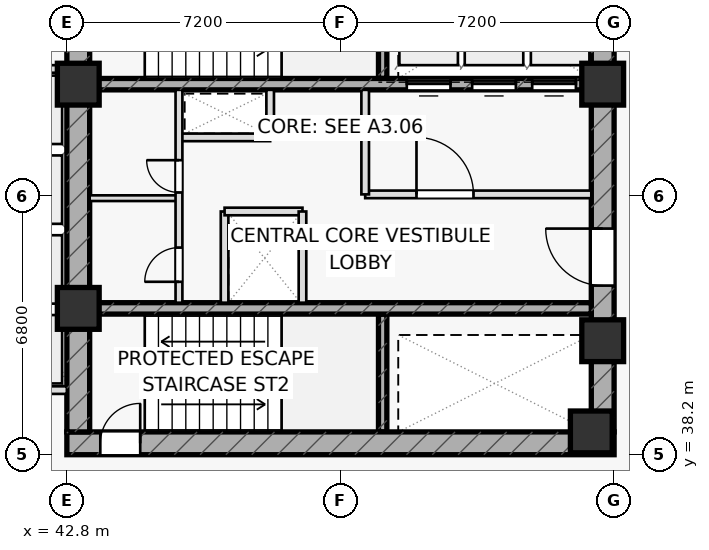
"""IFC4 building model, lengths in metres.
Left out: names, types, materials, properties, quantities, classifications, styles, units other than length and angle.
Written with IfcOpenShell. Run it as: python <this file> out.ifc"""

import sys

from ifc_helpers import new_model, si_unit, direction, frame, frame_2d, origin, origin_2d, place, context, subcontext, project, spatial, rectangle, extrude, element, fill, save


model = new_model("IFC4")
c1 = context("Model", 3, precision=1e-05, world=origin(), true_north=direction((0.0, 1.0)))
c2 = subcontext(c1, "Body", "Model", "MODEL_VIEW")
j1 = project(units=[si_unit("LENGTHUNIT", "METRE"), si_unit("PLANEANGLEUNIT", "RADIAN")], contexts=[c1])
p1 = place(None, origin())
s1 = spatial("IfcSite", under=j1, at=p1, CompositionType="ELEMENT")
p2 = place(p1, origin())
s2 = spatial("IfcBuilding", under=s1, at=p2, CompositionType="ELEMENT")
p3 = place(p2, frame((0.0, 0.0, 78.3)))
s3 = spatial("IfcBuildingStorey", under=s2, at=p3, CompositionType="ELEMENT", Elevation=78.3)
for number, where, z_axis, x_axis in (
    (1, (51.11, 48.1, 0.0), (0.0, 0.0, 1.0), (0.0, 1.0, 0.0)),
    (2, (51.11, 38.8, 0.0), (0.0, 0.0, 1.0), (0.0, 1.0, 0.0)),
):
    element("IfcWall", number, at=place(p3, frame(where, z_axis=z_axis, x_axis=x_axis)), inside=s3, PredefinedType="SHEAR", context=c2, shape_type="SweptSolid", body=[
        extrude(rectangle(XDim=3.1, YDim=0.22, at=frame_2d((1.55, 0.0))), origin(), (0.0, 0.0, 1.0), 3.6),
    ])
p4 = place(p3, frame((42.8, 38.5, 0.0), z_axis=(0.0, 0.0, 1.0), x_axis=(1.0, 0.0, 0.0)))
e3 = element("IfcWall", 3, at=p4, inside=s3, PredefinedType="SHEAR", context=c2, shape_type="SweptSolid", body=[
    extrude(rectangle(XDim=14.4, YDim=0.6, at=frame_2d((7.2, 0.0))), origin(), (0.0, 0.0, 1.0), 3.6),
])
p5 = place(p4, frame((0.88, 0.0, 0.0)))
e4 = element("IfcOpeningElement", 4, at=p5, cuts=e3, PredefinedType="OPENING", context=c2, shape_type="SweptSolid", body=[
    extrude(rectangle(XDim=1.05, YDim=2.2, at=frame_2d((0.525, 1.1))), frame((0.0, 0.31, 0.0), z_axis=(0.0, -1.0, 0.0), x_axis=(1.0, 0.0, 0.0)), (0.0, 0.0, 1.0), 0.62),
])
p6 = place(p3, frame((43.1, 38.8, 0.0), z_axis=(0.0, 0.0, 1.0), x_axis=(0.0, 1.0, 0.0)))
e5 = element("IfcWall", 5, at=p6, inside=s3, PredefinedType="SHEAR", context=c2, shape_type="SweptSolid", body=[
    extrude(rectangle(XDim=12.4, YDim=0.6, at=frame_2d((6.2, 0.0))), origin(), (0.0, 0.0, 1.0), 3.6),
])
p7 = place(p3, frame((56.9, 38.8, 0.0), z_axis=(0.0, 0.0, 1.0), x_axis=(0.0, 1.0, 0.0)))
e6 = element("IfcWall", 6, at=p7, inside=s3, PredefinedType="SHEAR", context=c2, shape_type="SweptSolid", body=[
    extrude(rectangle(XDim=12.4, YDim=0.6, at=frame_2d((6.2, 0.0))), origin(), (0.0, 0.0, 1.0), 3.6),
])
p8 = place(p7, frame((3.85, 0.0, 0.0)))
e7 = element("IfcOpeningElement", 7, at=p8, cuts=e6, PredefinedType="OPENING", context=c2, shape_type="SweptSolid", body=[
    extrude(rectangle(XDim=1.5, YDim=2.2, at=frame_2d((0.75, 1.1))), frame((0.0, 0.31, 0.0), z_axis=(0.0, -1.0, 0.0), x_axis=(1.0, 0.0, 0.0)), (0.0, 0.0, 1.0), 0.62),
])
p9 = place(p3, frame((43.4, 47.95, 0.0), z_axis=(0.0, 0.0, 1.0), x_axis=(1.0, 0.0, 0.0)))
e8 = element("IfcWall", 8, at=p9, inside=s3, PredefinedType="SHEAR", context=c2, shape_type="SweptSolid", body=[
    extrude(rectangle(XDim=13.2, YDim=0.3, at=frame_2d((6.6, 0.0))), origin(), (0.0, 0.0, 1.0), 3.6),
])
p10 = place(p9, frame((8.345, 0.0, 0.0)))
e9 = element("IfcOpeningElement", 9, at=p10, cuts=e8, PredefinedType="OPENING", context=c2, shape_type="SweptSolid", body=[
    extrude(rectangle(XDim=1.15, YDim=2.2, at=frame_2d((0.575, 1.1))), frame((0.0, 0.16, 0.0), z_axis=(0.0, -1.0, 0.0), x_axis=(1.0, 0.0, 0.0)), (0.0, 0.0, 1.0), 0.32),
])
p11 = place(p9, frame((10.065, 0.0, 0.0)))
e10 = element("IfcOpeningElement", 10, at=p11, cuts=e8, PredefinedType="OPENING", context=c2, shape_type="SweptSolid", body=[
    extrude(rectangle(XDim=1.15, YDim=2.2, at=frame_2d((0.575, 1.1))), frame((0.0, 0.16, 0.0), z_axis=(0.0, -1.0, 0.0), x_axis=(1.0, 0.0, 0.0)), (0.0, 0.0, 1.0), 0.32),
])
p12 = place(p9, frame((11.645, 0.0, 0.0)))
e11 = element("IfcOpeningElement", 11, at=p12, cuts=e8, PredefinedType="OPENING", context=c2, shape_type="SweptSolid", body=[
    extrude(rectangle(XDim=1.15, YDim=2.2, at=frame_2d((0.575, 1.1))), frame((0.0, 0.16, 0.0), z_axis=(0.0, -1.0, 0.0), x_axis=(1.0, 0.0, 0.0)), (0.0, 0.0, 1.0), 0.32),
])
p13 = place(p3, frame((43.4, 42.05, 0.0), z_axis=(0.0, 0.0, 1.0), x_axis=(1.0, 0.0, 0.0)))
e12 = element("IfcWall", 12, at=p13, inside=s3, PredefinedType="SHEAR", context=c2, shape_type="SweptSolid", body=[
    extrude(rectangle(XDim=13.2, YDim=0.3, at=frame_2d((6.6, 0.0))), origin(), (0.0, 0.0, 1.0), 3.6),
])
for number, where, z_axis, x_axis in (
    (13, (43.1, 47.95, 0.0), (0.0, 0.0, 1.0), (1.0, 0.0, 0.0)),
    (14, (56.9, 47.95, 0.0), (0.0, 0.0, 1.0), (1.0, 0.0, 0.0)),
    (15, (43.1, 42.05, 0.0), (0.0, 0.0, 1.0), (1.0, 0.0, 0.0)),
    (16, (56.9, 41.2, 0.0), (0.0, 0.0, 1.0), (1.0, 0.0, 0.0)),
    (17, (56.6, 38.8, 0.0), (0.0, 0.0, 1.0), (1.0, 0.0, 0.0)),
):
    element("IfcColumn", number, at=place(p3, frame(where, z_axis=z_axis, x_axis=x_axis)), inside=s3, PredefinedType="COLUMN", context=c2, shape_type="SweptSolid", body=[
        extrude(rectangle(XDim=1.1, YDim=1.1, at=origin_2d()), origin(), (0.0, 0.0, 1.0), 3.6),
    ])
for number, where, z_axis, x_axis in (
    (18, (40.3, 39.9, 0.0), (0.0, 0.0, 1.0), (1.0, 0.0, 0.0)),
    (19, (40.3, 48.35, 0.0), (0.0, 0.0, 1.0), (1.0, 0.0, 0.0)),
):
    element("IfcWall", number, at=place(p3, frame(where, z_axis=z_axis, x_axis=x_axis)), inside=s3, PredefinedType="PARTITIONING", context=c2, shape_type="SweptSolid", body=[
        extrude(rectangle(XDim=2.5, YDim=0.2, at=frame_2d((1.25, 0.0))), origin(), (0.0, 0.0, 1.0), 3.6),
    ])
p14 = place(p3, frame((45.75, 46.55, 0.0), z_axis=(0.0, 0.0, 1.0), x_axis=(1.0, 0.0, 0.0)))
e20 = element("IfcWall", 20, at=p14, inside=s3, PredefinedType="PARTITIONING", context=c2, shape_type="SweptSolid", body=[
    extrude(rectangle(XDim=2.4, YDim=0.2, at=frame_2d((1.2, 0.0))), origin(), (0.0, 0.0, 1.0), 3.6),
])
p15 = place(p3, frame((48.15, 46.55, 0.0), z_axis=(0.0, 0.0, 1.0), x_axis=(0.0, 1.0, 0.0)))
e21 = element("IfcWall", 21, at=p15, inside=s3, PredefinedType="PARTITIONING", context=c2, shape_type="SweptSolid", body=[
    extrude(rectangle(XDim=1.25, YDim=0.2, at=frame_2d((0.625, 0.0))), origin(), (0.0, 0.0, 1.0), 3.6),
])
p16 = place(p3, frame((46.95, 42.2, 0.0), z_axis=(0.0, 0.0, 1.0), x_axis=(0.0, 1.0, 0.0)))
e22 = element("IfcWall", 22, at=p16, inside=s3, PredefinedType="PARTITIONING", context=c2, shape_type="SweptSolid", body=[
    extrude(rectangle(XDim=2.4, YDim=0.2, at=frame_2d((1.2, 0.0))), origin(), (0.0, 0.0, 1.0), 3.6),
])
p17 = place(p3, frame((46.95, 44.6, 0.0), z_axis=(0.0, 0.0, 1.0), x_axis=(1.0, 0.0, 0.0)))
e23 = element("IfcWall", 23, at=p17, inside=s3, PredefinedType="PARTITIONING", context=c2, shape_type="SweptSolid", body=[
    extrude(rectangle(XDim=2.05, YDim=0.2, at=frame_2d((1.025, 0.0))), origin(), (0.0, 0.0, 1.0), 3.6),
])
p18 = place(p3, frame((50.65, 45.05, 0.0), z_axis=(0.0, 0.0, 1.0), x_axis=(1.0, 0.0, 0.0)))
e24 = element("IfcWall", 24, at=p18, inside=s3, PredefinedType="PARTITIONING", context=c2, shape_type="SweptSolid", body=[
    extrude(rectangle(XDim=5.95, YDim=0.2, at=frame_2d((2.975, 0.0))), origin(), (0.0, 0.0, 1.0), 3.6),
])
p19 = place(p18, frame((1.35, 0.0, 0.0)))
e25 = element("IfcOpeningElement", 25, at=p19, cuts=e24, PredefinedType="OPENING", context=c2, shape_type="SweptSolid", body=[
    extrude(rectangle(XDim=1.5, YDim=2.2, at=frame_2d((0.75, 1.1))), frame((0.0, 0.11, 0.0), z_axis=(0.0, -1.0, 0.0), x_axis=(1.0, 0.0, 0.0)), (0.0, 0.0, 1.0), 0.22),
])
p20 = place(p3, frame((50.65, 45.05, 0.0), z_axis=(0.0, 0.0, 1.0), x_axis=(0.0, 1.0, 0.0)))
e26 = element("IfcWall", 26, at=p20, inside=s3, PredefinedType="PARTITIONING", context=c2, shape_type="SweptSolid", body=[
    extrude(rectangle(XDim=2.75, YDim=0.2, at=frame_2d((1.375, 0.0))), origin(), (0.0, 0.0, 1.0), 3.6),
])
p21 = place(p3, frame((43.4, 44.95, 0.0), z_axis=(0.0, 0.0, 1.0), x_axis=(1.0, 0.0, 0.0)))
e27 = element("IfcWall", 27, at=p21, inside=s3, PredefinedType="PARTITIONING", context=c2, shape_type="SweptSolid", body=[
    extrude(rectangle(XDim=2.35, YDim=0.15, at=frame_2d((1.175, 0.0))), origin(), (0.0, 0.0, 1.0), 3.6),
])
p22 = place(p3, frame((45.75, 42.2, 0.0), z_axis=(0.0, 0.0, 1.0), x_axis=(0.0, 1.0, 0.0)))
e28 = element("IfcWall", 28, at=p22, inside=s3, PredefinedType="PARTITIONING", context=c2, shape_type="SweptSolid", body=[
    extrude(rectangle(XDim=5.6, YDim=0.18, at=frame_2d((2.8, 0.0))), origin(), (0.0, 0.0, 1.0), 3.6),
])
p23 = place(p22, frame((0.55, 0.0, 0.0)))
e29 = element("IfcOpeningElement", 29, at=p23, cuts=e28, PredefinedType="OPENING", context=c2, shape_type="SweptSolid", body=[
    extrude(rectangle(XDim=0.9, YDim=2.05, at=frame_2d((0.45, 1.025))), frame((0.0, 0.1, 0.0), z_axis=(0.0, -1.0, 0.0), x_axis=(1.0, 0.0, 0.0)), (0.0, 0.0, 1.0), 0.2),
])
p24 = place(p22, frame((2.9, 0.0, 0.0)))
e30 = element("IfcOpeningElement", 30, at=p24, cuts=e28, PredefinedType="OPENING", context=c2, shape_type="SweptSolid", body=[
    extrude(rectangle(XDim=0.85, YDim=2.05, at=frame_2d((0.425, 1.025))), frame((0.0, 0.1, 0.0), z_axis=(0.0, -1.0, 0.0), x_axis=(1.0, 0.0, 0.0)), (0.0, 0.0, 1.0), 0.2),
])
p25 = place(p3, frame((49.0, 42.2, 0.0), z_axis=(0.0, 0.0, 1.0), x_axis=(0.0, 1.0, 0.0)))
e31 = element("IfcWall", 31, at=p25, inside=s3, PredefinedType="PARTITIONING", context=c2, shape_type="SweptSolid", body=[
    extrude(rectangle(XDim=2.4, YDim=0.2, at=frame_2d((1.2, 0.0))), origin(), (0.0, 0.0, 1.0), 3.6),
])
p26 = place(p5, origin())
e32 = element("IfcDoor", 32, at=p26, inside=s3, OperationType="SINGLE_SWING_RIGHT", PredefinedType="DOOR", context=c2, shape_type="SweptSolid", body=[
    extrude(rectangle(XDim=1.05, YDim=2.2, at=frame_2d((0.525, 1.1))), frame((0.0, 0.025, 0.0), z_axis=(0.0, -1.0, 0.0), x_axis=(1.0, 0.0, 0.0)), (0.0, 0.0, 1.0), 0.05),
])
fill(e4, e32)
p27 = place(p8, origin())
e33 = element("IfcDoor", 33, at=p27, inside=s3, OperationType="SINGLE_SWING_RIGHT", PredefinedType="DOOR", context=c2, shape_type="SweptSolid", body=[
    extrude(rectangle(XDim=1.5, YDim=2.2, at=frame_2d((0.75, 1.1))), frame((0.0, 0.025, 0.0), z_axis=(0.0, -1.0, 0.0), x_axis=(1.0, 0.0, 0.0)), (0.0, 0.0, 1.0), 0.05),
])
fill(e7, e33)
p28 = place(p19, origin())
e34 = element("IfcDoor", 34, at=p28, inside=s3, OperationType="SINGLE_SWING_LEFT", PredefinedType="DOOR", context=c2, shape_type="SweptSolid", body=[
    extrude(rectangle(XDim=1.5, YDim=2.2, at=frame_2d((0.75, 1.1))), frame((0.0, 0.025, 0.0), z_axis=(0.0, -1.0, 0.0), x_axis=(1.0, 0.0, 0.0)), (0.0, 0.0, 1.0), 0.05),
])
fill(e25, e34)
p29 = place(p23, origin())
e35 = element("IfcDoor", 35, at=p29, inside=s3, OperationType="SINGLE_SWING_LEFT", PredefinedType="DOOR", context=c2, shape_type="SweptSolid", body=[
    extrude(rectangle(XDim=0.9, YDim=2.05, at=frame_2d((0.45, 1.025))), frame((0.0, 0.025, 0.0), z_axis=(0.0, -1.0, 0.0), x_axis=(1.0, 0.0, 0.0)), (0.0, 0.0, 1.0), 0.05),
])
fill(e29, e35)
p30 = place(p24, origin())
e36 = element("IfcDoor", 36, at=p30, inside=s3, OperationType="SINGLE_SWING_RIGHT", PredefinedType="DOOR", context=c2, shape_type="SweptSolid", body=[
    extrude(rectangle(XDim=0.85, YDim=2.05, at=frame_2d((0.425, 1.025))), frame((0.0, 0.025, 0.0), z_axis=(0.0, -1.0, 0.0), x_axis=(1.0, 0.0, 0.0)), (0.0, 0.0, 1.0), 0.05),
])
fill(e30, e36)
p31 = place(p10, origin())
e37 = element("IfcDoor", 37, at=p31, inside=s3, OperationType="SLIDING_TO_LEFT", PredefinedType="DOOR", context=c2, shape_type="SweptSolid", body=[
    extrude(rectangle(XDim=1.15, YDim=2.2, at=frame_2d((0.575, 1.1))), frame((0.0, 0.025, 0.0), z_axis=(0.0, -1.0, 0.0), x_axis=(1.0, 0.0, 0.0)), (0.0, 0.0, 1.0), 0.05),
])
fill(e9, e37)
p32 = place(p11, origin())
e38 = element("IfcDoor", 38, at=p32, inside=s3, OperationType="SLIDING_TO_LEFT", PredefinedType="DOOR", context=c2, shape_type="SweptSolid", body=[
    extrude(rectangle(XDim=1.15, YDim=2.2, at=frame_2d((0.575, 1.1))), frame((0.0, 0.025, 0.0), z_axis=(0.0, -1.0, 0.0), x_axis=(1.0, 0.0, 0.0)), (0.0, 0.0, 1.0), 0.05),
])
fill(e10, e38)
p33 = place(p12, origin())
e39 = element("IfcDoor", 39, at=p33, inside=s3, OperationType="SLIDING_TO_LEFT", PredefinedType="DOOR", context=c2, shape_type="SweptSolid", body=[
    extrude(rectangle(XDim=1.15, YDim=2.2, at=frame_2d((0.575, 1.1))), frame((0.0, 0.025, 0.0), z_axis=(0.0, -1.0, 0.0), x_axis=(1.0, 0.0, 0.0)), (0.0, 0.0, 1.0), 0.05),
])
fill(e11, e39)
save(model, sys.argv[1])
